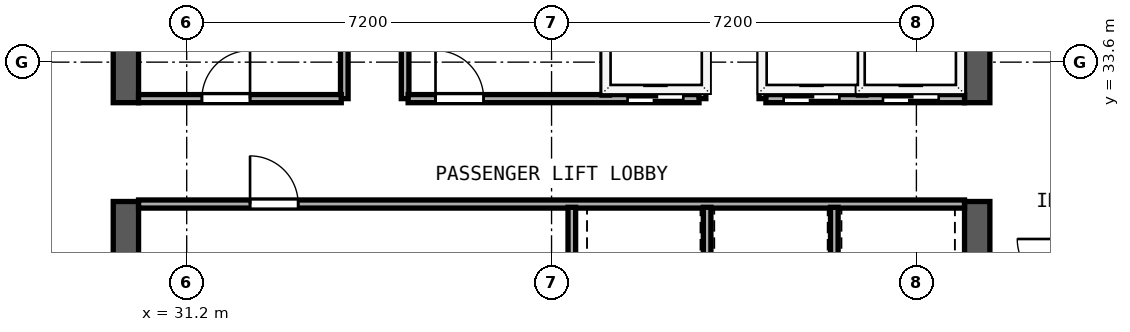
"""IFC4 building model, lengths in metres.
Left out: names, types, materials, properties, quantities, classifications, styles, units other than length and angle.
Written with IfcOpenShell. Run it as: python <this file> out.ifc"""

import sys

from ifc_helpers import new_model, si_unit, direction, frame, frame_2d, origin, place, context, subcontext, project, spatial, rectangle, extrude, element, fill, save


model = new_model("IFC4")
c1 = context("Model", 3, precision=1e-05, world=origin(), true_north=direction((0.0, 1.0)))
c2 = subcontext(c1, "Body", "Model", "MODEL_VIEW")
j1 = project(units=[si_unit("LENGTHUNIT", "METRE"), si_unit("PLANEANGLEUNIT", "RADIAN")], contexts=[c1])
p1 = place(None, origin())
s1 = spatial("IfcSite", under=j1, at=p1, CompositionType="ELEMENT")
p2 = place(p1, origin())
s2 = spatial("IfcBuilding", under=s1, at=p2, CompositionType="ELEMENT")
p3 = place(p2, frame((0.0, 0.0, 305.6)))
s3 = spatial("IfcBuildingStorey", under=s2, at=p3, CompositionType="ELEMENT", Elevation=305.6)
p4 = place(p3, frame((30.0, 26.65, 0.0), z_axis=(0.0, 0.0, 1.0), x_axis=(0.0, 1.0, 0.0)))
e1 = element("IfcWall", 1, at=p4, inside=s3, PredefinedType="SHEAR", context=c2, shape_type="SweptSolid", body=[
    extrude(rectangle(XDim=4.2, YDim=0.5, at=frame_2d((2.1, 0.0))), origin(), (0.0, 0.0, 1.0), 3.72),
])
p5 = place(p3, frame((30.0, 32.8, 0.0), z_axis=(0.0, 0.0, 1.0), x_axis=(0.0, 1.0, 0.0)))
e2 = element("IfcWall", 2, at=p5, inside=s3, PredefinedType="SHEAR", context=c2, shape_type="SweptSolid", body=[
    extrude(rectangle(XDim=10.15, YDim=0.5, at=frame_2d((5.075, 0.0))), origin(), (0.0, 0.0, 1.0), 3.72),
])
p6 = place(p3, frame((46.8, 26.65, 0.0), z_axis=(0.0, 0.0, 1.0), x_axis=(0.0, 1.0, 0.0)))
e3 = element("IfcWall", 3, at=p6, inside=s3, PredefinedType="SHEAR", context=c2, shape_type="SweptSolid", body=[
    extrude(rectangle(XDim=4.2, YDim=0.5, at=frame_2d((2.1, 0.0))), origin(), (0.0, 0.0, 1.0), 3.72),
])
p7 = place(p6, frame((1.35, 0.0, 0.0), z_axis=(0.0, 0.0, 1.0), x_axis=(-1.0, 0.0, 0.0)))
e4 = element("IfcOpeningElement", 4, at=p7, cuts=e3, PredefinedType="OPENING", context=c2, shape_type="SweptSolid", body=[
    extrude(rectangle(XDim=0.9, YDim=2.1, at=frame_2d((0.45, 1.05))), frame((0.0, 0.26, 0.0), z_axis=(0.0, -1.0, 0.0), x_axis=(1.0, 0.0, 0.0)), (0.0, 0.0, 1.0), 0.52),
])
p8 = place(p3, frame((46.8, 32.8, 0.0), z_axis=(0.0, 0.0, 1.0), x_axis=(0.0, 1.0, 0.0)))
e5 = element("IfcWall", 5, at=p8, inside=s3, PredefinedType="SHEAR", context=c2, shape_type="SweptSolid", body=[
    extrude(rectangle(XDim=10.15, YDim=0.5, at=frame_2d((5.075, 0.0))), origin(), (0.0, 0.0, 1.0), 3.72),
])
for number, where, z_axis, x_axis in (
    (6, (34.31, 32.88, 0.0), (0.0, 0.0, 1.0), (0.0, 1.0, 0.0)),
    (7, (35.51, 32.88, 0.0), (0.0, 0.0, 1.0), (0.0, 1.0, 0.0)),
    (8, (41.37, 32.88, 0.0), (0.0, 0.0, 1.0), (0.0, 1.0, 0.0)),
    (9, (42.57, 32.88, 0.0), (0.0, 0.0, 1.0), (0.0, 1.0, 0.0)),
):
    element("IfcWall", number, at=place(p3, frame(where, z_axis=z_axis, x_axis=x_axis)), inside=s3, PredefinedType="SOLIDWALL", context=c2, shape_type="SweptSolid", body=[
        extrude(rectangle(XDim=2.17, YDim=0.15, at=frame_2d((1.085, 0.0))), origin(), (0.0, 0.0, 1.0), 3.72),
    ])
p9 = place(p3, frame((30.25, 32.88, 0.0), z_axis=(0.0, 0.0, 1.0), x_axis=(1.0, 0.0, 0.0)))
e10 = element("IfcWall", 10, at=p9, inside=s3, PredefinedType="SOLIDWALL", context=c2, shape_type="SweptSolid", body=[
    extrude(rectangle(XDim=4.0, YDim=0.16, at=frame_2d((2.0, 0.0))), origin(), (0.0, 0.0, 1.0), 3.72),
])
p10 = place(p9, frame((2.2, 0.0, 0.0), z_axis=(0.0, 0.0, 1.0), x_axis=(-1.0, 0.0, 0.0)))
e11 = element("IfcOpeningElement", 11, at=p10, cuts=e10, PredefinedType="OPENING", context=c2, shape_type="SweptSolid", body=[
    extrude(rectangle(XDim=0.95, YDim=2.12, at=frame_2d((0.475, 1.06))), frame((0.0, 0.09, 0.0), z_axis=(0.0, -1.0, 0.0), x_axis=(1.0, 0.0, 0.0)), (0.0, 0.0, 1.0), 0.18),
])
p11 = place(p3, frame((35.57, 32.88, 0.0), z_axis=(0.0, 0.0, 1.0), x_axis=(1.0, 0.0, 0.0)))
e12 = element("IfcWall", 12, at=p11, inside=s3, PredefinedType="SOLIDWALL", context=c2, shape_type="SweptSolid", body=[
    extrude(rectangle(XDim=5.74, YDim=0.16, at=frame_2d((2.87, 0.0))), origin(), (0.0, 0.0, 1.0), 3.72),
])
p12 = place(p11, frame((1.49, 0.0, 0.0), z_axis=(0.0, 0.0, 1.0), x_axis=(-1.0, 0.0, 0.0)))
e13 = element("IfcOpeningElement", 13, at=p12, cuts=e12, PredefinedType="OPENING", context=c2, shape_type="SweptSolid", body=[
    extrude(rectangle(XDim=0.95, YDim=2.12, at=frame_2d((0.475, 1.06))), frame((0.0, 0.09, 0.0), z_axis=(0.0, -1.0, 0.0), x_axis=(1.0, 0.0, 0.0)), (0.0, 0.0, 1.0), 0.18),
])
p13 = place(p11, frame((5.43, 0.0, 0.0), z_axis=(0.0, 0.0, 1.0), x_axis=(-1.0, 0.0, 0.0)))
e14 = element("IfcOpeningElement", 14, at=p13, cuts=e12, PredefinedType="OPENING", context=c2, shape_type="SweptSolid", body=[
    extrude(rectangle(XDim=1.1, YDim=2.2, at=frame_2d((0.55, 1.1))), frame((0.0, 0.09, 0.0), z_axis=(0.0, -1.0, 0.0), x_axis=(1.0, 0.0, 0.0)), (0.0, 0.0, 1.0), 0.18),
])
p14 = place(p3, frame((42.63, 32.88, 0.0), z_axis=(0.0, 0.0, 1.0), x_axis=(1.0, 0.0, 0.0)))
e15 = element("IfcWall", 15, at=p14, inside=s3, PredefinedType="SOLIDWALL", context=c2, shape_type="SweptSolid", body=[
    extrude(rectangle(XDim=3.92, YDim=0.16, at=frame_2d((1.96, 0.0))), origin(), (0.0, 0.0, 1.0), 3.72),
])
p15 = place(p14, frame((1.45, 0.0, 0.0), z_axis=(0.0, 0.0, 1.0), x_axis=(-1.0, 0.0, 0.0)))
e16 = element("IfcOpeningElement", 16, at=p15, cuts=e15, PredefinedType="OPENING", context=c2, shape_type="SweptSolid", body=[
    extrude(rectangle(XDim=1.1, YDim=2.2, at=frame_2d((0.55, 1.1))), frame((0.0, 0.09, 0.0), z_axis=(0.0, -1.0, 0.0), x_axis=(1.0, 0.0, 0.0)), (0.0, 0.0, 1.0), 0.18),
])
p16 = place(p14, frame((3.41, 0.0, 0.0), z_axis=(0.0, 0.0, 1.0), x_axis=(-1.0, 0.0, 0.0)))
e17 = element("IfcOpeningElement", 17, at=p16, cuts=e15, PredefinedType="OPENING", context=c2, shape_type="SweptSolid", body=[
    extrude(rectangle(XDim=1.1, YDim=2.2, at=frame_2d((0.55, 1.1))), frame((0.0, 0.09, 0.0), z_axis=(0.0, -1.0, 0.0), x_axis=(1.0, 0.0, 0.0)), (0.0, 0.0, 1.0), 0.18),
])
for number, where, z_axis, x_axis in (
    (18, (39.47, 32.95, 0.0), (0.0, 0.0, 1.0), (0.0, 1.0, 0.0)),
    (19, (44.53, 32.95, 0.0), (0.0, 0.0, 1.0), (0.0, 1.0, 0.0)),
):
    element("IfcWall", number, at=place(p3, frame(where, z_axis=z_axis, x_axis=x_axis)), inside=s3, PredefinedType="SOLIDWALL", context=c2, shape_type="SweptSolid", body=[
        extrude(rectangle(XDim=2.05, YDim=0.15, at=frame_2d((1.025, 0.0))), origin(), (0.0, 0.0, 1.0), 3.72),
    ])
p17 = place(p3, frame((30.25, 30.8, 0.0), z_axis=(0.0, 0.0, 1.0), x_axis=(1.0, 0.0, 0.0)))
e20 = element("IfcWall", 20, at=p17, inside=s3, PredefinedType="SOLIDWALL", context=c2, shape_type="SweptSolid", body=[
    extrude(rectangle(XDim=16.3, YDim=0.16, at=frame_2d((8.15, 0.0))), origin(), (0.0, 0.0, 1.0), 3.72),
])
p18 = place(p17, frame((2.2, 0.0, 0.0)))
e21 = element("IfcOpeningElement", 21, at=p18, cuts=e20, PredefinedType="OPENING", context=c2, shape_type="SweptSolid", body=[
    extrude(rectangle(XDim=0.95, YDim=2.12, at=frame_2d((0.475, 1.06))), frame((0.0, 0.09, 0.0), z_axis=(0.0, -1.0, 0.0), x_axis=(1.0, 0.0, 0.0)), (0.0, 0.0, 1.0), 0.18),
])
p19 = place(p3, frame((38.8, 26.66, 0.0), z_axis=(0.0, 0.0, 1.0), x_axis=(0.0, 1.0, 0.0)))
e22 = element("IfcWall", 22, at=p19, inside=s3, PredefinedType="SOLIDWALL", context=c2, shape_type="SweptSolid", body=[
    extrude(rectangle(XDim=4.075, YDim=0.15, at=frame_2d((2.038, 0.0))), origin(), (0.0, 0.0, 1.0), 3.72),
])
for number, where, z_axis, x_axis in (
    (23, (41.47, 28.75, 0.0), (0.0, 0.0, 1.0), (0.0, 1.0, 0.0)),
    (24, (43.98, 28.75, 0.0), (0.0, 0.0, 1.0), (0.0, 1.0, 0.0)),
):
    element("IfcWall", number, at=place(p3, frame(where, z_axis=z_axis, x_axis=x_axis)), inside=s3, PredefinedType="SOLIDWALL", context=c2, shape_type="SweptSolid", body=[
        extrude(rectangle(XDim=1.985, YDim=0.15, at=frame_2d((0.993, 0.0))), origin(), (0.0, 0.0, 1.0), 3.72),
    ])
p20 = place(p10, origin())
e25 = element("IfcDoor", 25, at=p20, inside=s3, OperationType="SINGLE_SWING_LEFT", PredefinedType="DOOR", context=c2, shape_type="SweptSolid", body=[
    extrude(rectangle(XDim=0.95, YDim=2.12, at=frame_2d((0.475, 1.06))), frame((0.0, 0.025, 0.0), z_axis=(0.0, -1.0, 0.0), x_axis=(1.0, 0.0, 0.0)), (0.0, 0.0, 1.0), 0.05),
])
fill(e11, e25)
p21 = place(p12, origin())
e26 = element("IfcDoor", 26, at=p21, inside=s3, OperationType="SINGLE_SWING_RIGHT", PredefinedType="DOOR", context=c2, shape_type="SweptSolid", body=[
    extrude(rectangle(XDim=0.95, YDim=2.12, at=frame_2d((0.475, 1.06))), frame((0.0, 0.025, 0.0), z_axis=(0.0, -1.0, 0.0), x_axis=(1.0, 0.0, 0.0)), (0.0, 0.0, 1.0), 0.05),
])
fill(e13, e26)
p22 = place(p13, origin())
e27 = element("IfcDoor", 27, at=p22, inside=s3, OperationType="SLIDING_TO_RIGHT", PredefinedType="DOOR", context=c2, shape_type="SweptSolid", body=[
    extrude(rectangle(XDim=1.1, YDim=2.2, at=frame_2d((0.55, 1.1))), frame((0.0, 0.025, 0.0), z_axis=(0.0, -1.0, 0.0), x_axis=(1.0, 0.0, 0.0)), (0.0, 0.0, 1.0), 0.05),
])
fill(e14, e27)
p23 = place(p15, origin())
e28 = element("IfcDoor", 28, at=p23, inside=s3, OperationType="SLIDING_TO_RIGHT", PredefinedType="DOOR", context=c2, shape_type="SweptSolid", body=[
    extrude(rectangle(XDim=1.1, YDim=2.2, at=frame_2d((0.55, 1.1))), frame((0.0, 0.025, 0.0), z_axis=(0.0, -1.0, 0.0), x_axis=(1.0, 0.0, 0.0)), (0.0, 0.0, 1.0), 0.05),
])
fill(e16, e28)
p24 = place(p16, origin())
e29 = element("IfcDoor", 29, at=p24, inside=s3, OperationType="SLIDING_TO_RIGHT", PredefinedType="DOOR", context=c2, shape_type="SweptSolid", body=[
    extrude(rectangle(XDim=1.1, YDim=2.2, at=frame_2d((0.55, 1.1))), frame((0.0, 0.025, 0.0), z_axis=(0.0, -1.0, 0.0), x_axis=(1.0, 0.0, 0.0)), (0.0, 0.0, 1.0), 0.05),
])
fill(e17, e29)
p25 = place(p18, origin())
e30 = element("IfcDoor", 30, at=p25, inside=s3, OperationType="SINGLE_SWING_LEFT", PredefinedType="DOOR", context=c2, shape_type="SweptSolid", body=[
    extrude(rectangle(XDim=0.95, YDim=2.12, at=frame_2d((0.475, 1.06))), frame((0.0, 0.025, 0.0), z_axis=(0.0, -1.0, 0.0), x_axis=(1.0, 0.0, 0.0)), (0.0, 0.0, 1.0), 0.05),
])
fill(e21, e30)
save(model, sys.argv[1])
